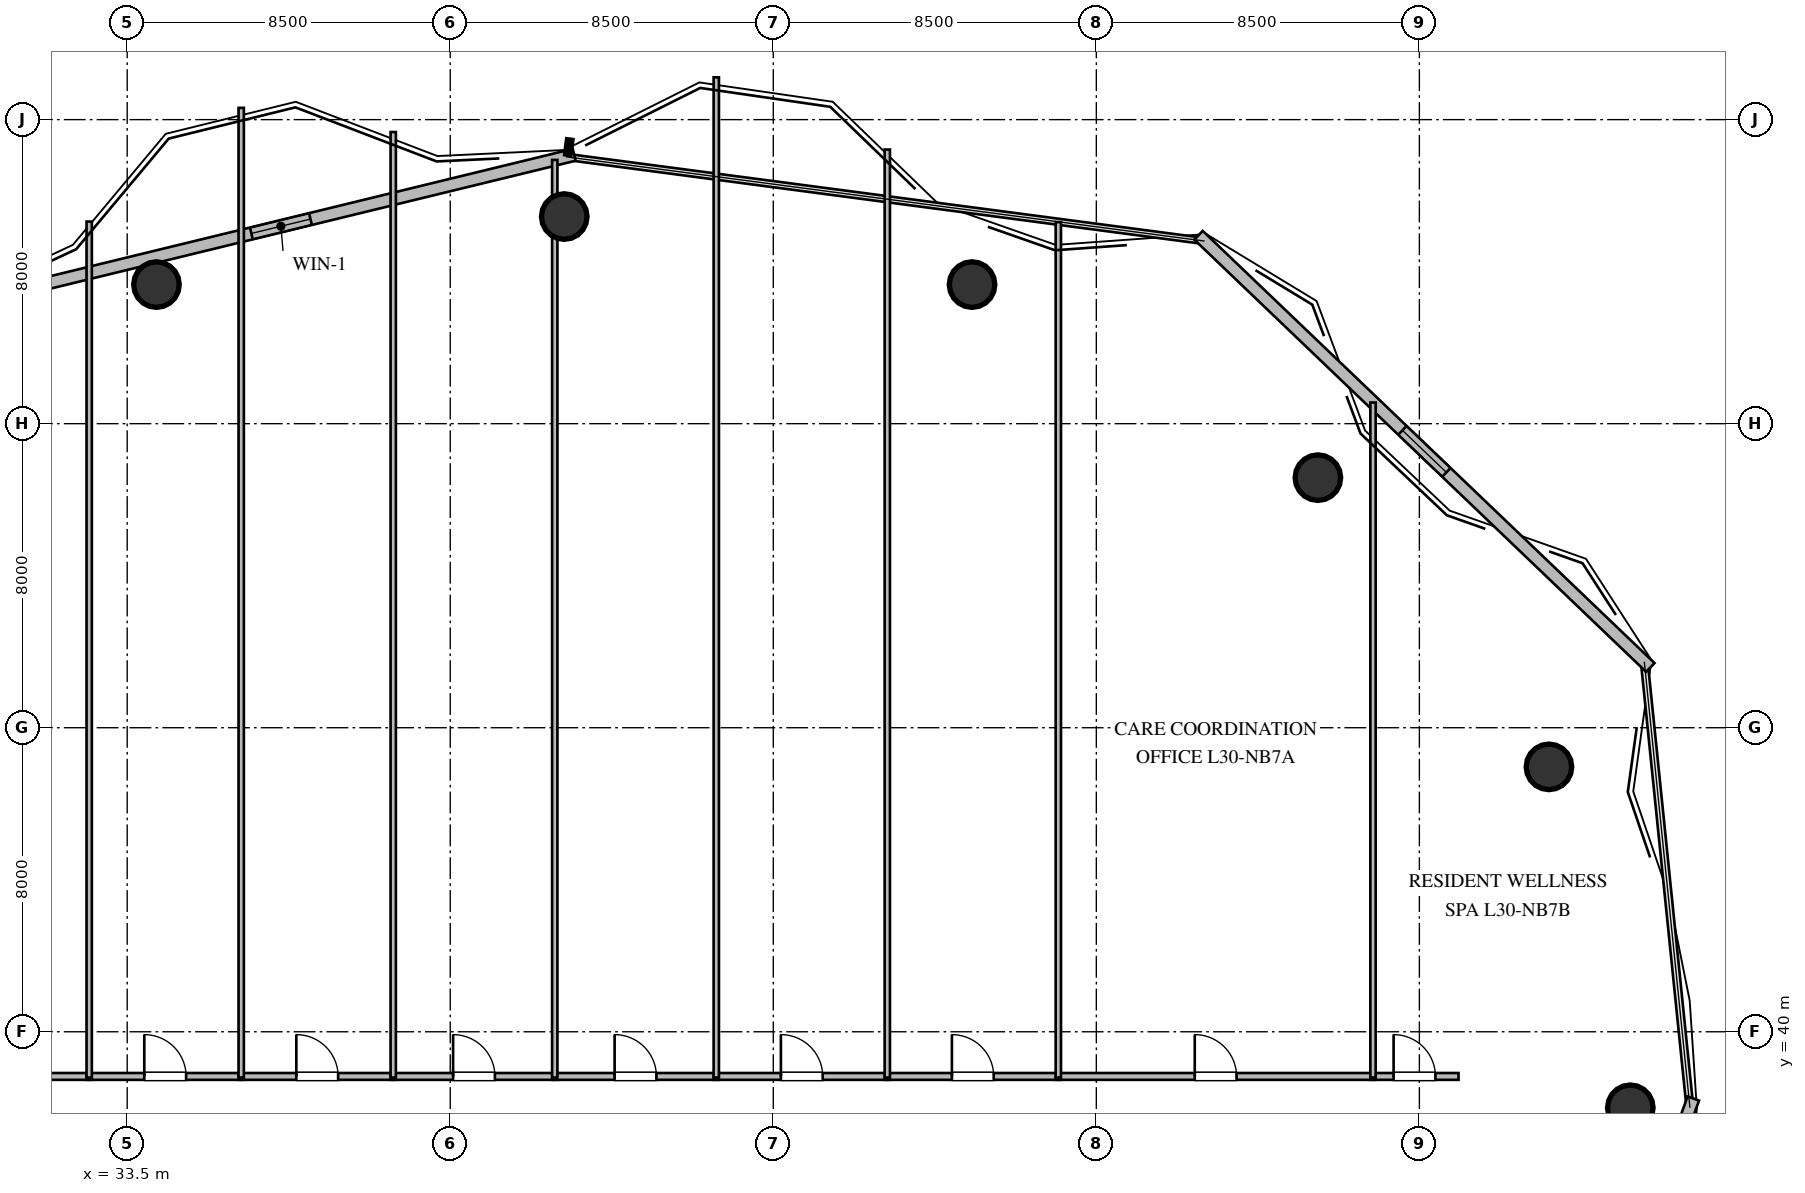
"""IFC4 building model, lengths in metres.
Left out: names, types, materials, properties, quantities, classifications, styles, units other than length and angle.
Written with IfcOpenShell. Run it as: python <this file> out.ifc"""

import sys

from ifc_helpers import new_model, si_unit, direction, frame, frame_2d, origin, origin_2d, place, context, subcontext, project, spatial, rectangle, circle, extrude, element, fill, save


model = new_model("IFC4")
c1 = context("Model", 3, precision=1e-05, world=origin(), true_north=direction((0.0, 1.0)))
c2 = subcontext(c1, "Body", "Model", "MODEL_VIEW")
j1 = project(units=[si_unit("LENGTHUNIT", "METRE"), si_unit("PLANEANGLEUNIT", "RADIAN")], contexts=[c1])
p1 = place(None, origin())
s1 = spatial("IfcSite", under=j1, at=p1, CompositionType="ELEMENT")
p2 = place(p1, origin())
s2 = spatial("IfcBuilding", under=s1, at=p2, CompositionType="ELEMENT")
p3 = place(p2, frame((0.0, 0.0, 117.0)))
s3 = spatial("IfcBuildingStorey", under=s2, at=p3, CompositionType="ELEMENT", Elevation=117.0)
for number, where, z_axis, x_axis in (
    (1, (73.05, 38.0, 0.0), (0.0, 0.0, 1.0), (1.0, 0.0, 0.0)),
    (2, (70.91, 46.97, 0.0), (0.0, 0.0, 1.0), (1.0, 0.0, 0.0)),
    (3, (64.83, 54.58, 0.0), (0.0, 0.0, 1.0), (1.0, 0.0, 0.0)),
    (4, (55.73, 59.66, 0.0), (0.0, 0.0, 1.0), (1.0, 0.0, 0.0)),
    (5, (45.0, 61.45, 0.0), (0.0, 0.0, 1.0), (1.0, 0.0, 0.0)),
    (6, (34.27, 59.66, 0.0), (0.0, 0.0, 1.0), (1.0, 0.0, 0.0)),
):
    element("IfcColumn", number, at=place(p3, frame(where, z_axis=z_axis, x_axis=x_axis)), inside=s3, PredefinedType="COLUMN", context=c2, shape_type="SweptSolid", body=[
        extrude(circle(Radius=0.6, at=origin_2d()), origin(), (0.0, 0.0, 1.0), 3.6),
    ])
p4 = place(p3, frame((74.708, 38.244, 0.0), z_axis=(0.0, 0.0, 1.0), x_axis=(-0.340324669139, -0.94030799187, 0.0)))
e7 = element("IfcWall", 7, at=p4, inside=s3, PredefinedType="STANDARD", context=c2, shape_type="SweptSolid", body=[
    extrude(rectangle(XDim=13.81, YDim=0.32, at=frame_2d((6.905, 0.0))), origin(), (0.0, 0.0, 1.0), 3.36),
])
p5 = place(p3, frame((28.974, 59.107, 0.0), z_axis=(0.0, 0.0, 1.0), x_axis=(0.971593971582, 0.236654081699, 0.0)))
e8 = element("IfcWall", 8, at=p5, inside=s3, PredefinedType="STANDARD", context=c2, shape_type="SweptSolid", body=[
    extrude(rectangle(XDim=16.763, YDim=0.32, at=frame_2d((8.381, 0.0))), origin(), (0.0, 0.0, 1.0), 3.36),
])
p6 = place(p5, frame((8.021, 0.0, 1.05)))
e9 = element("IfcOpeningElement", 9, at=p6, cuts=e8, PredefinedType="OPENING", context=c2, shape_type="SweptSolid", body=[
    extrude(rectangle(XDim=1.6, YDim=1.5, at=frame_2d((0.8, 0.75))), frame((0.0, 0.17, 0.0), z_axis=(0.0, -1.0, 0.0), x_axis=(1.0, 0.0, 0.0)), (0.0, 0.0, 1.0), 0.34),
])
p7 = place(p3, frame((61.689, 60.957, 0.0), z_axis=(0.0, 0.0, 1.0), x_axis=(0.722641212534, -0.691223319881, 0.0)))
e10 = element("IfcWall", 10, at=p7, inside=s3, PredefinedType="STANDARD", context=c2, shape_type="SweptSolid", body=[
    extrude(rectangle(XDim=16.451, YDim=0.32, at=frame_2d((8.225, 0.0))), origin(), (0.0, 0.0, 1.0), 3.36),
])
p8 = place(p7, frame((7.425, 0.0, 1.05)))
e11 = element("IfcOpeningElement", 11, at=p8, cuts=e10, PredefinedType="OPENING", context=c2, shape_type="SweptSolid", body=[
    extrude(rectangle(XDim=1.6, YDim=1.5, at=frame_2d((0.8, 0.75))), frame((0.0, 0.17, 0.0), z_axis=(0.0, -1.0, 0.0), x_axis=(1.0, 0.0, 0.0)), (0.0, 0.0, 1.0), 0.34),
])
p9 = place(p3, frame((28.685, 38.825, 0.0), z_axis=(0.0, 0.0, 1.0), x_axis=(1.0, 0.0, 0.0)))
e12 = element("IfcWall", 12, at=p9, inside=s3, PredefinedType="PARTITIONING", context=c2, shape_type="SweptSolid", body=[
    extrude(rectangle(XDim=3.88, YDim=0.18, at=frame_2d((1.94, 0.0))), origin(), (0.0, 0.0, 1.0), 3.36),
])
p10 = place(p9, frame((1.39, 0.0, 0.0)))
e13 = element("IfcOpeningElement", 13, at=p10, cuts=e12, PredefinedType="OPENING", context=c2, shape_type="SweptSolid", body=[
    extrude(rectangle(XDim=1.1, YDim=2.1, at=frame_2d((0.55, 1.05))), frame((0.0, 0.1, 0.0), z_axis=(0.0, -1.0, 0.0), x_axis=(1.0, 0.0, 0.0)), (0.0, 0.0, 1.0), 0.2),
])
p11 = place(p3, frame((32.435, 38.825, 0.0), z_axis=(0.0, 0.0, 1.0), x_axis=(1.0, 0.0, 0.0)))
e14 = element("IfcWall", 14, at=p11, inside=s3, PredefinedType="PARTITIONING", context=c2, shape_type="SweptSolid", body=[
    extrude(rectangle(XDim=4.13, YDim=0.18, at=frame_2d((2.065, 0.0))), origin(), (0.0, 0.0, 1.0), 3.36),
])
p12 = place(p11, frame((1.515, 0.0, 0.0)))
e15 = element("IfcOpeningElement", 15, at=p12, cuts=e14, PredefinedType="OPENING", context=c2, shape_type="SweptSolid", body=[
    extrude(rectangle(XDim=1.1, YDim=2.1, at=frame_2d((0.55, 1.05))), frame((0.0, 0.1, 0.0), z_axis=(0.0, -1.0, 0.0), x_axis=(1.0, 0.0, 0.0)), (0.0, 0.0, 1.0), 0.2),
])
p13 = place(p3, frame((36.435, 38.825, 0.0), z_axis=(0.0, 0.0, 1.0), x_axis=(1.0, 0.0, 0.0)))
e16 = element("IfcWall", 16, at=p13, inside=s3, PredefinedType="PARTITIONING", context=c2, shape_type="SweptSolid", body=[
    extrude(rectangle(XDim=4.13, YDim=0.18, at=frame_2d((2.065, 0.0))), origin(), (0.0, 0.0, 1.0), 3.36),
])
p14 = place(p13, frame((1.515, 0.0, 0.0)))
e17 = element("IfcOpeningElement", 17, at=p14, cuts=e16, PredefinedType="OPENING", context=c2, shape_type="SweptSolid", body=[
    extrude(rectangle(XDim=1.1, YDim=2.1, at=frame_2d((0.55, 1.05))), frame((0.0, 0.1, 0.0), z_axis=(0.0, -1.0, 0.0), x_axis=(1.0, 0.0, 0.0)), (0.0, 0.0, 1.0), 0.2),
])
p15 = place(p3, frame((40.435, 38.825, 0.0), z_axis=(0.0, 0.0, 1.0), x_axis=(1.0, 0.0, 0.0)))
e18 = element("IfcWall", 18, at=p15, inside=s3, PredefinedType="PARTITIONING", context=c2, shape_type="SweptSolid", body=[
    extrude(rectangle(XDim=4.38, YDim=0.18, at=frame_2d((2.19, 0.0))), origin(), (0.0, 0.0, 1.0), 3.36),
])
p16 = place(p15, frame((1.64, 0.0, 0.0)))
e19 = element("IfcOpeningElement", 19, at=p16, cuts=e18, PredefinedType="OPENING", context=c2, shape_type="SweptSolid", body=[
    extrude(rectangle(XDim=1.1, YDim=2.1, at=frame_2d((0.55, 1.05))), frame((0.0, 0.1, 0.0), z_axis=(0.0, -1.0, 0.0), x_axis=(1.0, 0.0, 0.0)), (0.0, 0.0, 1.0), 0.2),
])
p17 = place(p3, frame((44.685, 38.825, 0.0), z_axis=(0.0, 0.0, 1.0), x_axis=(1.0, 0.0, 0.0)))
e20 = element("IfcWall", 20, at=p17, inside=s3, PredefinedType="PARTITIONING", context=c2, shape_type="SweptSolid", body=[
    extrude(rectangle(XDim=4.38, YDim=0.18, at=frame_2d((2.19, 0.0))), origin(), (0.0, 0.0, 1.0), 3.36),
])
p18 = place(p17, frame((1.64, 0.0, 0.0)))
e21 = element("IfcOpeningElement", 21, at=p18, cuts=e20, PredefinedType="OPENING", context=c2, shape_type="SweptSolid", body=[
    extrude(rectangle(XDim=1.1, YDim=2.1, at=frame_2d((0.55, 1.05))), frame((0.0, 0.1, 0.0), z_axis=(0.0, -1.0, 0.0), x_axis=(1.0, 0.0, 0.0)), (0.0, 0.0, 1.0), 0.2),
])
p19 = place(p3, frame((48.935, 38.825, 0.0), z_axis=(0.0, 0.0, 1.0), x_axis=(1.0, 0.0, 0.0)))
e22 = element("IfcWall", 22, at=p19, inside=s3, PredefinedType="PARTITIONING", context=c2, shape_type="SweptSolid", body=[
    extrude(rectangle(XDim=4.63, YDim=0.18, at=frame_2d((2.315, 0.0))), origin(), (0.0, 0.0, 1.0), 3.36),
])
p20 = place(p19, frame((1.765, 0.0, 0.0)))
e23 = element("IfcOpeningElement", 23, at=p20, cuts=e22, PredefinedType="OPENING", context=c2, shape_type="SweptSolid", body=[
    extrude(rectangle(XDim=1.1, YDim=2.1, at=frame_2d((0.55, 1.05))), frame((0.0, 0.1, 0.0), z_axis=(0.0, -1.0, 0.0), x_axis=(1.0, 0.0, 0.0)), (0.0, 0.0, 1.0), 0.2),
])
p21 = place(p3, frame((53.435, 38.825, 0.0), z_axis=(0.0, 0.0, 1.0), x_axis=(1.0, 0.0, 0.0)))
e24 = element("IfcWall", 24, at=p21, inside=s3, PredefinedType="PARTITIONING", context=c2, shape_type="SweptSolid", body=[
    extrude(rectangle(XDim=4.63, YDim=0.18, at=frame_2d((2.315, 0.0))), origin(), (0.0, 0.0, 1.0), 3.36),
])
p22 = place(p21, frame((1.765, 0.0, 0.0)))
e25 = element("IfcOpeningElement", 25, at=p22, cuts=e24, PredefinedType="OPENING", context=c2, shape_type="SweptSolid", body=[
    extrude(rectangle(XDim=1.1, YDim=2.1, at=frame_2d((0.55, 1.05))), frame((0.0, 0.1, 0.0), z_axis=(0.0, -1.0, 0.0), x_axis=(1.0, 0.0, 0.0)), (0.0, 0.0, 1.0), 0.2),
])
p23 = place(p3, frame((57.935, 38.825, 0.0), z_axis=(0.0, 0.0, 1.0), x_axis=(1.0, 0.0, 0.0)))
e26 = element("IfcWall", 26, at=p23, inside=s3, PredefinedType="PARTITIONING", context=c2, shape_type="SweptSolid", body=[
    extrude(rectangle(XDim=8.41, YDim=0.18, at=frame_2d((4.205, 0.0))), origin(), (0.0, 0.0, 1.0), 3.36),
])
p24 = place(p23, frame((3.655, 0.0, 0.0)))
e27 = element("IfcOpeningElement", 27, at=p24, cuts=e26, PredefinedType="OPENING", context=c2, shape_type="SweptSolid", body=[
    extrude(rectangle(XDim=1.1, YDim=2.1, at=frame_2d((0.55, 1.05))), frame((0.0, 0.1, 0.0), z_axis=(0.0, -1.0, 0.0), x_axis=(1.0, 0.0, 0.0)), (0.0, 0.0, 1.0), 0.2),
])
p25 = place(p3, frame((66.215, 38.825, 0.0), z_axis=(0.0, 0.0, 1.0), x_axis=(1.0, 0.0, 0.0)))
e28 = element("IfcWall", 28, at=p25, inside=s3, PredefinedType="PARTITIONING", context=c2, shape_type="SweptSolid", body=[
    extrude(rectangle(XDim=2.315, YDim=0.18, at=frame_2d((1.157, 0.0))), origin(), (0.0, 0.0, 1.0), 3.36),
])
p26 = place(p25, frame((0.607, 0.0, 0.0)))
e29 = element("IfcOpeningElement", 29, at=p26, cuts=e28, PredefinedType="OPENING", context=c2, shape_type="SweptSolid", body=[
    extrude(rectangle(XDim=1.1, YDim=2.1, at=frame_2d((0.55, 1.05))), frame((0.0, 0.1, 0.0), z_axis=(0.0, -1.0, 0.0), x_axis=(1.0, 0.0, 0.0)), (0.0, 0.0, 1.0), 0.2),
])
p27 = place(p3, frame((32.5, 61.318, 0.0), z_axis=(0.0, 0.0, 1.0), x_axis=(0.0, -1.0, 0.0)))
e30 = element("IfcWall", 30, at=p27, inside=s3, PredefinedType="PARTITIONING", context=c2, shape_type="SweptSolid", body=[
    extrude(rectangle(XDim=22.523, YDim=0.14, at=frame_2d((11.262, 0.0))), origin(), (0.0, 0.0, 1.0), 3.36),
])
p28 = place(p3, frame((36.5, 64.31, 0.0), z_axis=(0.0, 0.0, 1.0), x_axis=(0.0, -1.0, 0.0)))
e31 = element("IfcWall", 31, at=p28, inside=s3, PredefinedType="PARTITIONING", context=c2, shape_type="SweptSolid", body=[
    extrude(rectangle(XDim=25.515, YDim=0.14, at=frame_2d((12.758, 0.0))), origin(), (0.0, 0.0, 1.0), 3.36),
])
p29 = place(p3, frame((40.5, 63.674, 0.0), z_axis=(0.0, 0.0, 1.0), x_axis=(0.0, -1.0, 0.0)))
e32 = element("IfcWall", 32, at=p29, inside=s3, PredefinedType="PARTITIONING", context=c2, shape_type="SweptSolid", body=[
    extrude(rectangle(XDim=24.879, YDim=0.14, at=frame_2d((12.439, 0.0))), origin(), (0.0, 0.0, 1.0), 3.36),
])
p30 = place(p3, frame((44.75, 62.939, 0.0), z_axis=(0.0, 0.0, 1.0), x_axis=(0.0, -1.0, 0.0)))
e33 = element("IfcWall", 33, at=p30, inside=s3, PredefinedType="PARTITIONING", context=c2, shape_type="SweptSolid", body=[
    extrude(rectangle(XDim=24.145, YDim=0.14, at=frame_2d((12.072, 0.0))), origin(), (0.0, 0.0, 1.0), 2.806),
])
p31 = place(p3, frame((49.0, 65.113, 0.0), z_axis=(0.0, 0.0, 1.0), x_axis=(0.0, -1.0, 0.0)))
e34 = element("IfcWall", 34, at=p31, inside=s3, PredefinedType="PARTITIONING", context=c2, shape_type="SweptSolid", body=[
    extrude(rectangle(XDim=26.318, YDim=0.14, at=frame_2d((13.159, 0.0))), origin(), (0.0, 0.0, 1.0), 3.36),
])
p32 = place(p3, frame((53.5, 63.213, 0.0), z_axis=(0.0, 0.0, 1.0), x_axis=(0.0, -1.0, 0.0)))
e35 = element("IfcWall", 35, at=p32, inside=s3, PredefinedType="PARTITIONING", context=c2, shape_type="SweptSolid", body=[
    extrude(rectangle(XDim=24.418, YDim=0.14, at=frame_2d((12.209, 0.0))), origin(), (0.0, 0.0, 1.0), 3.36),
])
p33 = place(p3, frame((58.0, 61.303, 0.0), z_axis=(0.0, 0.0, 1.0), x_axis=(0.0, -1.0, 0.0)))
e36 = element("IfcWall", 36, at=p33, inside=s3, PredefinedType="PARTITIONING", context=c2, shape_type="SweptSolid", body=[
    extrude(rectangle(XDim=22.508, YDim=0.14, at=frame_2d((11.254, 0.0))), origin(), (0.0, 0.0, 1.0), 3.36),
])
p34 = place(p3, frame((66.28, 56.556, 0.0), z_axis=(0.0, 0.0, 1.0), x_axis=(0.0, -1.0, 0.0)))
e37 = element("IfcWall", 37, at=p34, inside=s3, PredefinedType="PARTITIONING", context=c2, shape_type="SweptSolid", body=[
    extrude(rectangle(XDim=17.761, YDim=0.14, at=frame_2d((8.88, 0.0))), origin(), (0.0, 0.0, 1.0), 3.36),
])
p35 = place(p6, origin())
e38 = element("IfcWindow", 38, at=p35, inside=s3, PartitioningType="SINGLE_PANEL", PredefinedType="WINDOW", context=c2, shape_type="SweptSolid", body=[
    extrude(rectangle(XDim=1.6, YDim=1.5, at=frame_2d((0.8, 0.75))), frame((0.0, 0.03, 0.0), z_axis=(0.0, -1.0, 0.0), x_axis=(1.0, 0.0, 0.0)), (0.0, 0.0, 1.0), 0.06),
])
fill(e9, e38)
p36 = place(p8, origin())
e39 = element("IfcWindow", 39, at=p36, inside=s3, PartitioningType="SINGLE_PANEL", PredefinedType="WINDOW", context=c2, shape_type="SweptSolid", body=[
    extrude(rectangle(XDim=1.6, YDim=1.5, at=frame_2d((0.8, 0.75))), frame((0.0, 0.03, 0.0), z_axis=(0.0, -1.0, 0.0), x_axis=(1.0, 0.0, 0.0)), (0.0, 0.0, 1.0), 0.06),
])
fill(e11, e39)
p37 = place(p12, origin())
e40 = element("IfcDoor", 40, at=p37, inside=s3, OperationType="SINGLE_SWING_LEFT", PredefinedType="DOOR", context=c2, shape_type="SweptSolid", body=[
    extrude(rectangle(XDim=1.1, YDim=2.1, at=frame_2d((0.55, 1.05))), frame((0.0, 0.025, 0.0), z_axis=(0.0, -1.0, 0.0), x_axis=(1.0, 0.0, 0.0)), (0.0, 0.0, 1.0), 0.05),
])
fill(e15, e40)
p38 = place(p14, origin())
e41 = element("IfcDoor", 41, at=p38, inside=s3, OperationType="SINGLE_SWING_LEFT", PredefinedType="DOOR", context=c2, shape_type="SweptSolid", body=[
    extrude(rectangle(XDim=1.1, YDim=2.1, at=frame_2d((0.55, 1.05))), frame((0.0, 0.025, 0.0), z_axis=(0.0, -1.0, 0.0), x_axis=(1.0, 0.0, 0.0)), (0.0, 0.0, 1.0), 0.05),
])
fill(e17, e41)
p39 = place(p16, origin())
e42 = element("IfcDoor", 42, at=p39, inside=s3, OperationType="SINGLE_SWING_LEFT", PredefinedType="DOOR", context=c2, shape_type="SweptSolid", body=[
    extrude(rectangle(XDim=1.1, YDim=2.1, at=frame_2d((0.55, 1.05))), frame((0.0, 0.025, 0.0), z_axis=(0.0, -1.0, 0.0), x_axis=(1.0, 0.0, 0.0)), (0.0, 0.0, 1.0), 0.05),
])
fill(e19, e42)
p40 = place(p18, origin())
e43 = element("IfcDoor", 43, at=p40, inside=s3, OperationType="SINGLE_SWING_LEFT", PredefinedType="DOOR", context=c2, shape_type="SweptSolid", body=[
    extrude(rectangle(XDim=1.1, YDim=2.1, at=frame_2d((0.55, 1.05))), frame((0.0, 0.025, 0.0), z_axis=(0.0, -1.0, 0.0), x_axis=(1.0, 0.0, 0.0)), (0.0, 0.0, 1.0), 0.05),
])
fill(e21, e43)
p41 = place(p20, origin())
e44 = element("IfcDoor", 44, at=p41, inside=s3, OperationType="SINGLE_SWING_LEFT", PredefinedType="DOOR", context=c2, shape_type="SweptSolid", body=[
    extrude(rectangle(XDim=1.1, YDim=2.1, at=frame_2d((0.55, 1.05))), frame((0.0, 0.025, 0.0), z_axis=(0.0, -1.0, 0.0), x_axis=(1.0, 0.0, 0.0)), (0.0, 0.0, 1.0), 0.05),
])
fill(e23, e44)
p42 = place(p22, origin())
e45 = element("IfcDoor", 45, at=p42, inside=s3, OperationType="SINGLE_SWING_LEFT", PredefinedType="DOOR", context=c2, shape_type="SweptSolid", body=[
    extrude(rectangle(XDim=1.1, YDim=2.1, at=frame_2d((0.55, 1.05))), frame((0.0, 0.025, 0.0), z_axis=(0.0, -1.0, 0.0), x_axis=(1.0, 0.0, 0.0)), (0.0, 0.0, 1.0), 0.05),
])
fill(e25, e45)
p43 = place(p24, origin())
e46 = element("IfcDoor", 46, at=p43, inside=s3, OperationType="SINGLE_SWING_LEFT", PredefinedType="DOOR", context=c2, shape_type="SweptSolid", body=[
    extrude(rectangle(XDim=1.1, YDim=2.1, at=frame_2d((0.55, 1.05))), frame((0.0, 0.025, 0.0), z_axis=(0.0, -1.0, 0.0), x_axis=(1.0, 0.0, 0.0)), (0.0, 0.0, 1.0), 0.05),
])
fill(e27, e46)
p44 = place(p26, origin())
e47 = element("IfcDoor", 47, at=p44, inside=s3, OperationType="SINGLE_SWING_LEFT", PredefinedType="DOOR", context=c2, shape_type="SweptSolid", body=[
    extrude(rectangle(XDim=1.1, YDim=2.1, at=frame_2d((0.55, 1.05))), frame((0.0, 0.025, 0.0), z_axis=(0.0, -1.0, 0.0), x_axis=(1.0, 0.0, 0.0)), (0.0, 0.0, 1.0), 0.05),
])
fill(e29, e47)
save(model, sys.argv[1])
